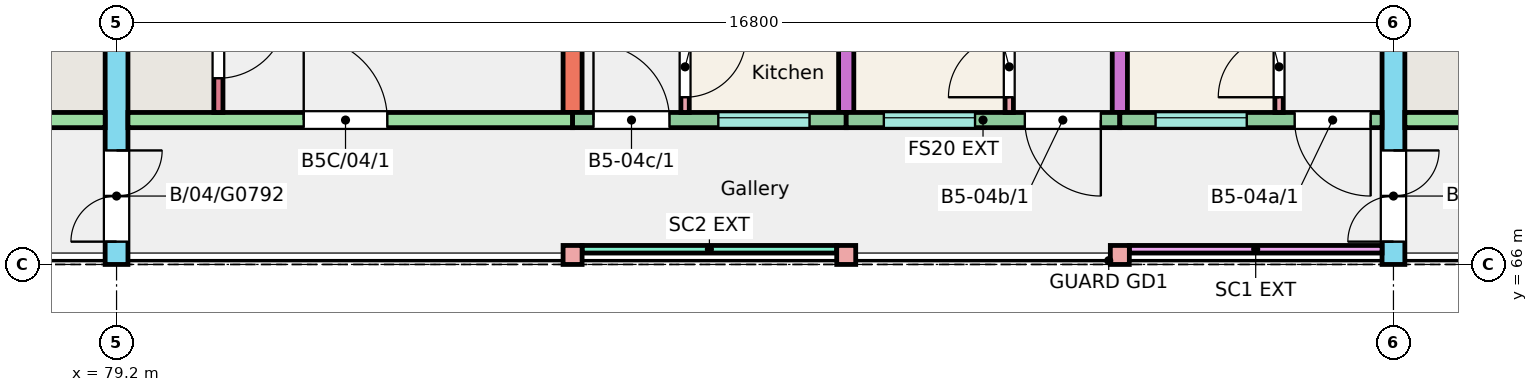
"""IFC4 building model, lengths in metres.
Left out: names, types, materials, properties, quantities, classifications, styles, units other than length and angle.
Written with IfcOpenShell. Run it as: python <this file> out.ifc"""

import sys

from ifc_helpers import new_model, si_unit, direction, frame, frame_2d, origin, origin_2d, place, context, subcontext, project, spatial, rectangle, extrude, element, fill, save


model = new_model("IFC4")
c1 = context("Model", 3, precision=1e-05, world=origin(), true_north=direction((0.0, 1.0)))
c2 = subcontext(c1, "Body", "Model", "MODEL_VIEW")
j1 = project(units=[si_unit("LENGTHUNIT", "METRE"), si_unit("PLANEANGLEUNIT", "RADIAN")], contexts=[c1])
p1 = place(None, origin())
s1 = spatial("IfcSite", under=j1, at=p1, CompositionType="ELEMENT")
p2 = place(p1, origin())
s2 = spatial("IfcBuilding", under=s1, at=p2, CompositionType="ELEMENT")
p3 = place(p2, frame((0.0, 0.0, 12.0)))
s3 = spatial("IfcBuildingStorey", under=s2, at=p3, CompositionType="ELEMENT", Elevation=12.0)
p4 = place(p3, frame((79.2, 66.0, 0.0), z_axis=(0.0, 0.0, 1.0), x_axis=(0.0, 1.0, 0.0)))
e1 = element("IfcWall", 1, at=p4, inside=s3, PredefinedType="SHEAR", context=c2, shape_type="SweptSolid", body=[
    extrude(rectangle(XDim=11.0, YDim=0.3, at=frame_2d((5.5, 0.0))), origin(), (0.0, 0.0, 1.0), 3.0),
])
p5 = place(p4, frame((0.3, 0.0, 0.0)))
e2 = element("IfcOpeningElement", 2, at=p5, cuts=e1, PredefinedType="OPENING", context=c2, shape_type="SweptSolid", body=[
    extrude(rectangle(XDim=1.2, YDim=2.1, at=frame_2d((0.6, 1.05))), frame((0.0, 0.16, 0.0), z_axis=(0.0, -1.0, 0.0), x_axis=(1.0, 0.0, 0.0)), (0.0, 0.0, 1.0), 0.32),
])
p6 = place(p3, frame((85.2, 68.0, 0.0), z_axis=(0.0, 0.0, 1.0), x_axis=(0.0, 1.0, 0.0)))
e3 = element("IfcWall", 3, at=p6, inside=s3, PredefinedType="SHEAR", context=c2, shape_type="SweptSolid", body=[
    extrude(rectangle(XDim=9.0, YDim=0.25, at=frame_2d((4.5, 0.0))), origin(), (0.0, 0.0, 1.0), 3.0),
])
for number, where, z_axis, x_axis in (
    (4, (88.8, 68.0, 0.0), (0.0, 0.0, 1.0), (0.0, 1.0, 0.0)),
    (5, (92.4, 68.0, 0.0), (0.0, 0.0, 1.0), (0.0, 1.0, 0.0)),
):
    element("IfcWall", number, at=place(p3, frame(where, z_axis=z_axis, x_axis=x_axis)), inside=s3, PredefinedType="SHEAR", context=c2, shape_type="SweptSolid", body=[
        extrude(rectangle(XDim=9.0, YDim=0.2, at=frame_2d((4.5, 0.0))), origin(), (0.0, 0.0, 1.0), 3.0),
    ])
p7 = place(p3, frame((96.0, 66.0, 0.0), z_axis=(0.0, 0.0, 1.0), x_axis=(0.0, 1.0, 0.0)))
e6 = element("IfcWall", 6, at=p7, inside=s3, PredefinedType="SHEAR", context=c2, shape_type="SweptSolid", body=[
    extrude(rectangle(XDim=11.0, YDim=0.3, at=frame_2d((5.5, 0.0))), origin(), (0.0, 0.0, 1.0), 3.0),
])
p8 = place(p7, frame((0.3, 0.0, 0.0)))
e7 = element("IfcOpeningElement", 7, at=p8, cuts=e6, PredefinedType="OPENING", context=c2, shape_type="SweptSolid", body=[
    extrude(rectangle(XDim=1.2, YDim=2.1, at=frame_2d((0.6, 1.05))), frame((0.0, 0.16, 0.0), z_axis=(0.0, -1.0, 0.0), x_axis=(1.0, 0.0, 0.0)), (0.0, 0.0, 1.0), 0.32),
])
p9 = place(p3, frame((73.2, 67.9, 0.0), z_axis=(0.0, 0.0, 1.0), x_axis=(1.0, 0.0, 0.0)))
e8 = element("IfcWall", 8, at=p9, inside=s3, PredefinedType="SHEAR", context=c2, shape_type="SweptSolid", body=[
    extrude(rectangle(XDim=5.85, YDim=0.2, at=frame_2d((2.925, 0.0))), origin(), (0.0, 0.0, 1.0), 3.0),
])
p10 = place(p9, frame((2.438, 0.0, 0.0)))
e9 = element("IfcOpeningElement", 9, at=p10, cuts=e8, PredefinedType="OPENING", context=c2, shape_type="SweptSolid", body=[
    extrude(rectangle(XDim=1.1, YDim=2.1, at=frame_2d((0.55, 1.05))), frame((0.0, 0.11, 0.0), z_axis=(0.0, -1.0, 0.0), x_axis=(1.0, 0.0, 0.0)), (0.0, 0.0, 1.0), 0.22),
])
p11 = place(p3, frame((79.35, 67.9, 0.0), z_axis=(0.0, 0.0, 1.0), x_axis=(1.0, 0.0, 0.0)))
e10 = element("IfcWall", 10, at=p11, inside=s3, PredefinedType="SHEAR", context=c2, shape_type="SweptSolid", body=[
    extrude(rectangle(XDim=5.85, YDim=0.2, at=frame_2d((2.925, 0.0))), origin(), (0.0, 0.0, 1.0), 3.0),
])
p12 = place(p11, frame((2.312, 0.0, 0.0)))
e11 = element("IfcOpeningElement", 11, at=p12, cuts=e10, PredefinedType="OPENING", context=c2, shape_type="SweptSolid", body=[
    extrude(rectangle(XDim=1.1, YDim=2.1, at=frame_2d((0.55, 1.05))), frame((0.0, 0.11, 0.0), z_axis=(0.0, -1.0, 0.0), x_axis=(1.0, 0.0, 0.0)), (0.0, 0.0, 1.0), 0.22),
])
p13 = place(p3, frame((80.54, 68.0, 0.0), z_axis=(0.0, 0.0, 1.0), x_axis=(0.0, 1.0, 0.0)))
e12 = element("IfcWall", 12, at=p13, inside=s3, PredefinedType="SHEAR", context=c2, shape_type="SweptSolid", body=[
    extrude(rectangle(XDim=1.72, YDim=0.12, at=frame_2d((0.86, 0.0))), origin(), (0.0, 0.0, 1.0), 3.0),
])
p14 = place(p13, frame((0.45, 0.0, 0.0)))
e13 = element("IfcOpeningElement", 13, at=p14, cuts=e12, PredefinedType="OPENING", context=c2, shape_type="SweptSolid", body=[
    extrude(rectangle(XDim=0.9, YDim=2.1, at=frame_2d((0.45, 1.05))), frame((0.0, 0.07, 0.0), z_axis=(0.0, -1.0, 0.0), x_axis=(1.0, 0.0, 0.0)), (0.0, 0.0, 1.0), 0.14),
])
p15 = place(p3, frame((85.2, 67.9, 0.0), z_axis=(0.0, 0.0, 1.0), x_axis=(1.0, 0.0, 0.0)))
e14 = element("IfcWall", 14, at=p15, inside=s3, PredefinedType="SOLIDWALL", context=c2, shape_type="SweptSolid", body=[
    extrude(rectangle(XDim=3.6, YDim=0.2, at=frame_2d((1.8, 0.0))), origin(), (0.0, 0.0, 1.0), 3.0),
])
p16 = place(p15, frame((1.917, 0.0, 1.1)))
e15 = element("IfcOpeningElement", 15, at=p16, cuts=e14, PredefinedType="OPENING", context=c2, shape_type="SweptSolid", body=[
    extrude(rectangle(XDim=1.2, YDim=1.3, at=frame_2d((0.6, 0.65))), frame((0.0, 0.11, 0.0), z_axis=(0.0, -1.0, 0.0), x_axis=(1.0, 0.0, 0.0)), (0.0, 0.0, 1.0), 0.22),
])
p17 = place(p15, frame((0.275, 0.0, 0.0)))
e16 = element("IfcOpeningElement", 16, at=p17, cuts=e14, PredefinedType="OPENING", context=c2, shape_type="SweptSolid", body=[
    extrude(rectangle(XDim=1.0, YDim=2.1, at=frame_2d((0.5, 1.05))), frame((0.0, 0.11, 0.0), z_axis=(0.0, -1.0, 0.0), x_axis=(1.0, 0.0, 0.0)), (0.0, 0.0, 1.0), 0.22),
])
p18 = place(p3, frame((88.8, 67.9, 0.0), z_axis=(0.0, 0.0, 1.0), x_axis=(1.0, 0.0, 0.0)))
e17 = element("IfcWall", 17, at=p18, inside=s3, PredefinedType="SOLIDWALL", context=c2, shape_type="SweptSolid", body=[
    extrude(rectangle(XDim=3.6, YDim=0.2, at=frame_2d((1.8, 0.0))), origin(), (0.0, 0.0, 1.0), 3.0),
])
p19 = place(p18, frame((0.495, 0.0, 1.1)))
e18 = element("IfcOpeningElement", 18, at=p19, cuts=e17, PredefinedType="OPENING", context=c2, shape_type="SweptSolid", body=[
    extrude(rectangle(XDim=1.2, YDim=1.3, at=frame_2d((0.6, 0.65))), frame((0.0, 0.11, 0.0), z_axis=(0.0, -1.0, 0.0), x_axis=(1.0, 0.0, 0.0)), (0.0, 0.0, 1.0), 0.22),
])
p20 = place(p18, frame((2.35, 0.0, 0.0)))
e19 = element("IfcOpeningElement", 19, at=p20, cuts=e17, PredefinedType="OPENING", context=c2, shape_type="SweptSolid", body=[
    extrude(rectangle(XDim=1.0, YDim=2.1, at=frame_2d((0.5, 1.05))), frame((0.0, 0.11, 0.0), z_axis=(0.0, -1.0, 0.0), x_axis=(1.0, 0.0, 0.0)), (0.0, 0.0, 1.0), 0.22),
])
p21 = place(p3, frame((92.4, 67.9, 0.0), z_axis=(0.0, 0.0, 1.0), x_axis=(1.0, 0.0, 0.0)))
e20 = element("IfcWall", 20, at=p21, inside=s3, PredefinedType="SOLIDWALL", context=c2, shape_type="SweptSolid", body=[
    extrude(rectangle(XDim=3.45, YDim=0.2, at=frame_2d((1.725, 0.0))), origin(), (0.0, 0.0, 1.0), 3.0),
])
p22 = place(p21, frame((0.47, 0.0, 1.1)))
e21 = element("IfcOpeningElement", 21, at=p22, cuts=e20, PredefinedType="OPENING", context=c2, shape_type="SweptSolid", body=[
    extrude(rectangle(XDim=1.2, YDim=1.3, at=frame_2d((0.6, 0.65))), frame((0.0, 0.11, 0.0), z_axis=(0.0, -1.0, 0.0), x_axis=(1.0, 0.0, 0.0)), (0.0, 0.0, 1.0), 0.22),
])
p23 = place(p21, frame((2.3, 0.0, 0.0)))
e22 = element("IfcOpeningElement", 22, at=p23, cuts=e20, PredefinedType="OPENING", context=c2, shape_type="SweptSolid", body=[
    extrude(rectangle(XDim=1.0, YDim=2.1, at=frame_2d((0.5, 1.05))), frame((0.0, 0.11, 0.0), z_axis=(0.0, -1.0, 0.0), x_axis=(1.0, 0.0, 0.0)), (0.0, 0.0, 1.0), 0.22),
])
p24 = place(p3, frame((96.15, 67.9, 0.0), z_axis=(0.0, 0.0, 1.0), x_axis=(1.0, 0.0, 0.0)))
e23 = element("IfcWall", 23, at=p24, inside=s3, PredefinedType="SHEAR", context=c2, shape_type="SweptSolid", body=[
    extrude(rectangle(XDim=5.85, YDim=0.2, at=frame_2d((2.925, 0.0))), origin(), (0.0, 0.0, 1.0), 3.0),
])
p25 = place(p24, frame((2.312, 0.0, 0.0)))
e24 = element("IfcOpeningElement", 24, at=p25, cuts=e23, PredefinedType="OPENING", context=c2, shape_type="SweptSolid", body=[
    extrude(rectangle(XDim=1.1, YDim=2.1, at=frame_2d((0.55, 1.05))), frame((0.0, 0.11, 0.0), z_axis=(0.0, -1.0, 0.0), x_axis=(1.0, 0.0, 0.0)), (0.0, 0.0, 1.0), 0.22),
])
for number, where, z_axis, x_axis in (
    (25, (85.2, 66.125, 0.0), (0.0, 0.0, 1.0), (1.0, 0.0, 0.0)),
    (26, (88.8, 66.125, 0.0), (0.0, 0.0, 1.0), (1.0, 0.0, 0.0)),
    (27, (92.4, 66.125, 0.0), (0.0, 0.0, 1.0), (1.0, 0.0, 0.0)),
):
    element("IfcColumn", number, at=place(p3, frame(where, z_axis=z_axis, x_axis=x_axis)), inside=s3, PredefinedType="COLUMN", context=c2, shape_type="SweptSolid", body=[
        extrude(rectangle(XDim=0.25, YDim=0.25, at=origin_2d()), origin(), (0.0, 0.0, 1.0), 3.0),
    ])
p26 = place(p3, frame((85.325, 66.2, 0.0), z_axis=(0.0, 0.0, 1.0), x_axis=(1.0, 0.0, 0.0)))
e28 = element("IfcWall", 28, at=p26, inside=s3, PredefinedType="SOLIDWALL", context=c2, shape_type="SweptSolid", body=[
    extrude(rectangle(XDim=3.35, YDim=0.1, at=frame_2d((1.675, 0.0))), origin(), (0.0, 0.0, 1.0), 2.45),
])
p27 = place(p3, frame((92.525, 66.2, 0.0), z_axis=(0.0, 0.0, 1.0), x_axis=(1.0, 0.0, 0.0)))
e29 = element("IfcWall", 29, at=p27, inside=s3, PredefinedType="SOLIDWALL", context=c2, shape_type="SweptSolid", body=[
    extrude(rectangle(XDim=3.325, YDim=0.1, at=frame_2d((1.663, 0.0))), origin(), (0.0, 0.0, 1.0), 2.45),
])
p28 = place(p3, frame((94.495, 68.0, 0.0), z_axis=(0.0, 0.0, 1.0), x_axis=(0.0, 1.0, 0.0)))
e30 = element("IfcWall", 30, at=p28, inside=s3, PredefinedType="PARTITIONING", context=c2, shape_type="SweptSolid", body=[
    extrude(rectangle(XDim=4.3, YDim=0.11, at=frame_2d((2.15, 0.0))), origin(), (0.0, 0.0, 1.0), 2.8),
])
p29 = place(p28, frame((0.2, 0.0, 0.0)))
e31 = element("IfcOpeningElement", 31, at=p29, cuts=e30, PredefinedType="OPENING", context=c2, shape_type="SweptSolid", body=[
    extrude(rectangle(XDim=0.8, YDim=2.1, at=frame_2d((0.4, 1.05))), frame((0.0, 0.065, 0.0), z_axis=(0.0, -1.0, 0.0), x_axis=(1.0, 0.0, 0.0)), (0.0, 0.0, 1.0), 0.13),
])
p30 = place(p28, frame((3.35, 0.0, 0.0)))
e32 = element("IfcOpeningElement", 32, at=p30, cuts=e30, PredefinedType="OPENING", context=c2, shape_type="SweptSolid", body=[
    extrude(rectangle(XDim=0.8, YDim=2.1, at=frame_2d((0.4, 1.05))), frame((0.0, 0.065, 0.0), z_axis=(0.0, -1.0, 0.0), x_axis=(1.0, 0.0, 0.0)), (0.0, 0.0, 1.0), 0.13),
])
p31 = place(p3, frame((90.945, 68.0, 0.0), z_axis=(0.0, 0.0, 1.0), x_axis=(0.0, 1.0, 0.0)))
e33 = element("IfcWall", 33, at=p31, inside=s3, PredefinedType="PARTITIONING", context=c2, shape_type="SweptSolid", body=[
    extrude(rectangle(XDim=4.3, YDim=0.11, at=frame_2d((2.15, 0.0))), origin(), (0.0, 0.0, 1.0), 2.8),
])
p32 = place(p31, frame((0.2, 0.0, 0.0)))
e34 = element("IfcOpeningElement", 34, at=p32, cuts=e33, PredefinedType="OPENING", context=c2, shape_type="SweptSolid", body=[
    extrude(rectangle(XDim=0.8, YDim=2.1, at=frame_2d((0.4, 1.05))), frame((0.0, 0.065, 0.0), z_axis=(0.0, -1.0, 0.0), x_axis=(1.0, 0.0, 0.0)), (0.0, 0.0, 1.0), 0.13),
])
p33 = place(p31, frame((3.35, 0.0, 0.0)))
e35 = element("IfcOpeningElement", 35, at=p33, cuts=e33, PredefinedType="OPENING", context=c2, shape_type="SweptSolid", body=[
    extrude(rectangle(XDim=0.8, YDim=2.1, at=frame_2d((0.4, 1.05))), frame((0.0, 0.065, 0.0), z_axis=(0.0, -1.0, 0.0), x_axis=(1.0, 0.0, 0.0)), (0.0, 0.0, 1.0), 0.13),
])
p34 = place(p3, frame((86.68, 68.0, 0.0), z_axis=(0.0, 0.0, 1.0), x_axis=(0.0, 1.0, 0.0)))
e36 = element("IfcWall", 36, at=p34, inside=s3, PredefinedType="PARTITIONING", context=c2, shape_type="SweptSolid", body=[
    extrude(rectangle(XDim=4.5, YDim=0.11, at=frame_2d((2.25, 0.0))), origin(), (0.0, 0.0, 1.0), 2.8),
])
p35 = place(p34, frame((0.2, 0.0, 0.0)))
e37 = element("IfcOpeningElement", 37, at=p35, cuts=e36, PredefinedType="OPENING", context=c2, shape_type="SweptSolid", body=[
    extrude(rectangle(XDim=0.8, YDim=2.1, at=frame_2d((0.4, 1.05))), frame((0.0, 0.065, 0.0), z_axis=(0.0, -1.0, 0.0), x_axis=(1.0, 0.0, 0.0)), (0.0, 0.0, 1.0), 0.13),
])
p36 = place(p34, frame((3.55, 0.0, 0.0)))
e38 = element("IfcOpeningElement", 38, at=p36, cuts=e36, PredefinedType="OPENING", context=c2, shape_type="SweptSolid", body=[
    extrude(rectangle(XDim=0.8, YDim=2.1, at=frame_2d((0.4, 1.05))), frame((0.0, 0.065, 0.0), z_axis=(0.0, -1.0, 0.0), x_axis=(1.0, 0.0, 0.0)), (0.0, 0.0, 1.0), 0.13),
])
p37 = place(p22, origin())
e39 = element("IfcWindow", 39, at=p37, inside=s3, PartitioningType="SINGLE_PANEL", PredefinedType="WINDOW", context=c2, shape_type="SweptSolid", body=[
    extrude(rectangle(XDim=1.2, YDim=1.3, at=frame_2d((0.6, 0.65))), frame((0.0, 0.06, 0.0), z_axis=(0.0, -1.0, 0.0), x_axis=(1.0, 0.0, 0.0)), (0.0, 0.0, 1.0), 0.06),
])
fill(e21, e39)
p38 = place(p19, origin())
e40 = element("IfcWindow", 40, at=p38, inside=s3, PartitioningType="SINGLE_PANEL", PredefinedType="WINDOW", context=c2, shape_type="SweptSolid", body=[
    extrude(rectangle(XDim=1.2, YDim=1.3, at=frame_2d((0.6, 0.65))), frame((0.0, 0.06, 0.0), z_axis=(0.0, -1.0, 0.0), x_axis=(1.0, 0.0, 0.0)), (0.0, 0.0, 1.0), 0.06),
])
fill(e18, e40)
p39 = place(p16, origin())
e41 = element("IfcWindow", 41, at=p39, inside=s3, PartitioningType="SINGLE_PANEL", PredefinedType="WINDOW", context=c2, shape_type="SweptSolid", body=[
    extrude(rectangle(XDim=1.2, YDim=1.3, at=frame_2d((0.6, 0.65))), frame((0.0, 0.06, 0.0), z_axis=(0.0, -1.0, 0.0), x_axis=(1.0, 0.0, 0.0)), (0.0, 0.0, 1.0), 0.06),
])
fill(e15, e41)
p40 = place(p23, origin())
e42 = element("IfcDoor", 42, at=p40, inside=s3, OperationType="SINGLE_SWING_RIGHT", PredefinedType="DOOR", context=c2, shape_type="SweptSolid", body=[
    extrude(rectangle(XDim=1.0, YDim=2.1, at=frame_2d((0.5, 1.05))), frame((0.0, 0.025, 0.0), z_axis=(0.0, -1.0, 0.0), x_axis=(1.0, 0.0, 0.0)), (0.0, 0.0, 1.0), 0.05),
])
fill(e22, e42)
p41 = place(p29, origin())
e43 = element("IfcDoor", 43, at=p41, inside=s3, OperationType="SINGLE_SWING_LEFT", PredefinedType="DOOR", context=c2, shape_type="SweptSolid", body=[
    extrude(rectangle(XDim=0.8, YDim=2.1, at=frame_2d((0.4, 1.05))), frame((0.0, 0.025, 0.0), z_axis=(0.0, -1.0, 0.0), x_axis=(1.0, 0.0, 0.0)), (0.0, 0.0, 1.0), 0.05),
])
fill(e31, e43)
p42 = place(p20, origin())
e44 = element("IfcDoor", 44, at=p42, inside=s3, OperationType="SINGLE_SWING_RIGHT", PredefinedType="DOOR", context=c2, shape_type="SweptSolid", body=[
    extrude(rectangle(XDim=1.0, YDim=2.1, at=frame_2d((0.5, 1.05))), frame((0.0, 0.025, 0.0), z_axis=(0.0, -1.0, 0.0), x_axis=(1.0, 0.0, 0.0)), (0.0, 0.0, 1.0), 0.05),
])
fill(e19, e44)
p43 = place(p32, origin())
e45 = element("IfcDoor", 45, at=p43, inside=s3, OperationType="SINGLE_SWING_LEFT", PredefinedType="DOOR", context=c2, shape_type="SweptSolid", body=[
    extrude(rectangle(XDim=0.8, YDim=2.1, at=frame_2d((0.4, 1.05))), frame((0.0, 0.025, 0.0), z_axis=(0.0, -1.0, 0.0), x_axis=(1.0, 0.0, 0.0)), (0.0, 0.0, 1.0), 0.05),
])
fill(e34, e45)
p44 = place(p17, origin())
e46 = element("IfcDoor", 46, at=p44, inside=s3, OperationType="SINGLE_SWING_LEFT", PredefinedType="DOOR", context=c2, shape_type="SweptSolid", body=[
    extrude(rectangle(XDim=1.0, YDim=2.1, at=frame_2d((0.5, 1.05))), frame((0.0, 0.025, 0.0), z_axis=(0.0, -1.0, 0.0), x_axis=(1.0, 0.0, 0.0)), (0.0, 0.0, 1.0), 0.05),
])
fill(e16, e46)
p45 = place(p35, origin())
e47 = element("IfcDoor", 47, at=p45, inside=s3, OperationType="SINGLE_SWING_RIGHT", PredefinedType="DOOR", context=c2, shape_type="SweptSolid", body=[
    extrude(rectangle(XDim=0.8, YDim=2.1, at=frame_2d((0.4, 1.05))), frame((0.0, 0.025, 0.0), z_axis=(0.0, -1.0, 0.0), x_axis=(1.0, 0.0, 0.0)), (0.0, 0.0, 1.0), 0.05),
])
fill(e37, e47)
p46 = place(p12, origin())
e48 = element("IfcDoor", 48, at=p46, inside=s3, OperationType="SINGLE_SWING_LEFT", PredefinedType="DOOR", context=c2, shape_type="SweptSolid", body=[
    extrude(rectangle(XDim=1.1, YDim=2.1, at=frame_2d((0.55, 1.05))), frame((0.0, 0.025, 0.0), z_axis=(0.0, -1.0, 0.0), x_axis=(1.0, 0.0, 0.0)), (0.0, 0.0, 1.0), 0.05),
])
fill(e11, e48)
p47 = place(p14, origin())
e49 = element("IfcDoor", 49, at=p47, inside=s3, OperationType="SINGLE_SWING_RIGHT", PredefinedType="DOOR", context=c2, shape_type="SweptSolid", body=[
    extrude(rectangle(XDim=0.9, YDim=2.1, at=frame_2d((0.45, 1.05))), frame((0.0, 0.025, 0.0), z_axis=(0.0, -1.0, 0.0), x_axis=(1.0, 0.0, 0.0)), (0.0, 0.0, 1.0), 0.05),
])
fill(e13, e49)
p48 = place(p5, origin())
e50 = element("IfcDoor", 50, at=p48, inside=s3, OperationType="DOUBLE_DOOR_SINGLE_SWING", PredefinedType="DOOR", context=c2, shape_type="SweptSolid", body=[
    extrude(rectangle(XDim=1.2, YDim=2.1, at=frame_2d((0.6, 1.05))), frame((0.0, 0.025, 0.0), z_axis=(0.0, -1.0, 0.0), x_axis=(1.0, 0.0, 0.0)), (0.0, 0.0, 1.0), 0.05),
])
fill(e2, e50)
p49 = place(p8, origin())
e51 = element("IfcDoor", 51, at=p49, inside=s3, OperationType="DOUBLE_DOOR_SINGLE_SWING", PredefinedType="DOOR", context=c2, shape_type="SweptSolid", body=[
    extrude(rectangle(XDim=1.2, YDim=2.1, at=frame_2d((0.6, 1.05))), frame((0.0, 0.025, 0.0), z_axis=(0.0, -1.0, 0.0), x_axis=(1.0, 0.0, 0.0)), (0.0, 0.0, 1.0), 0.05),
])
fill(e7, e51)
save(model, sys.argv[1])
